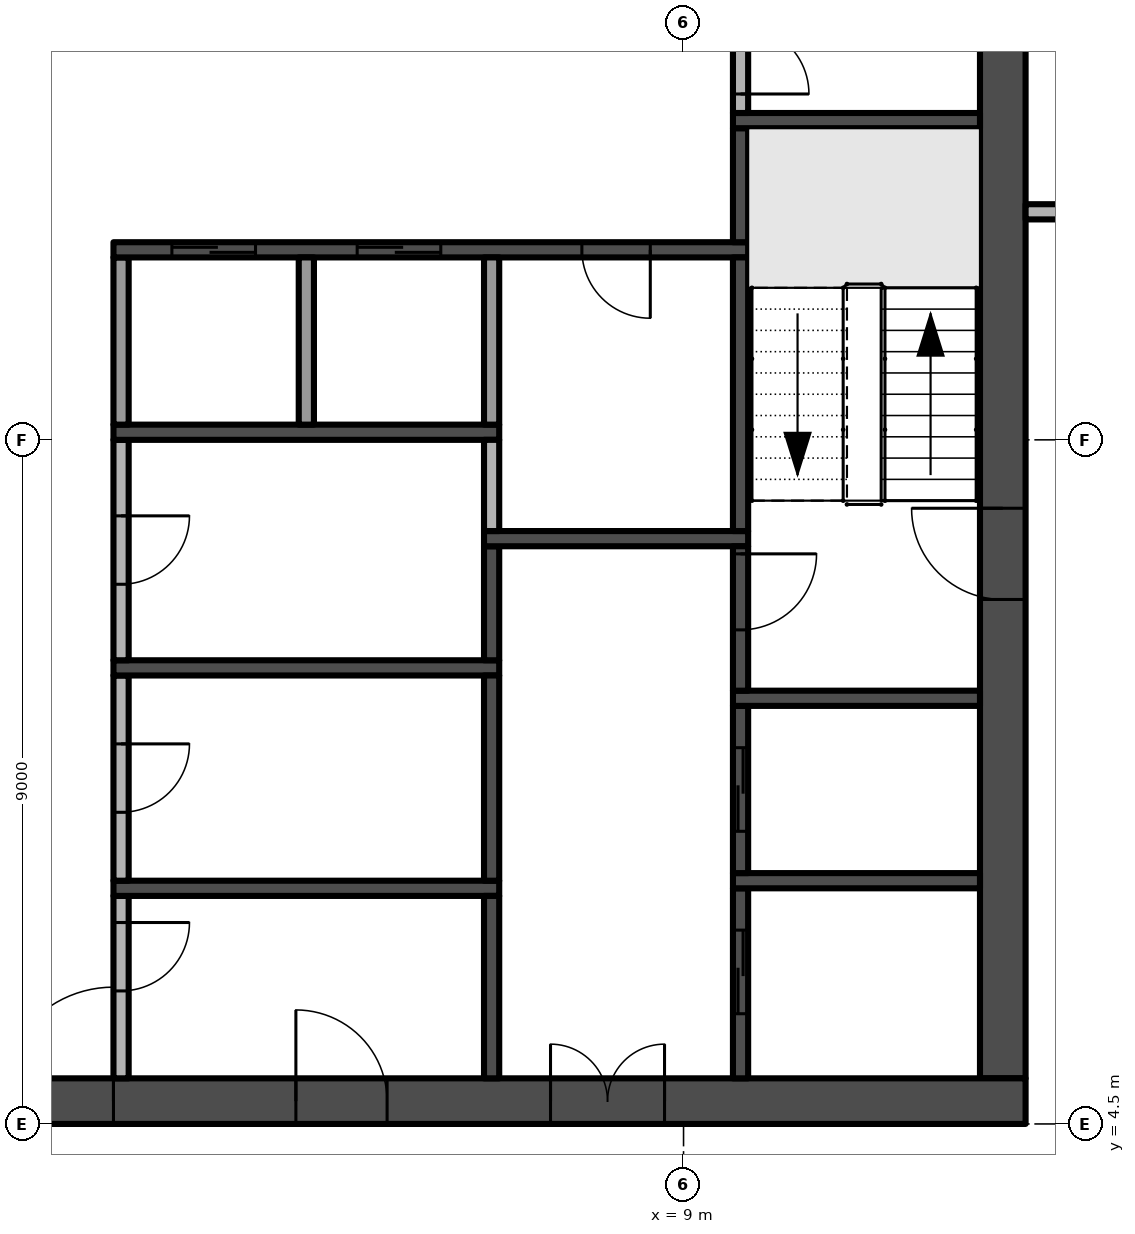
"""IFC4 building model, lengths in metres.
Left out: names, types, materials, properties, quantities, classifications, styles, units other than length and angle.
Written with IfcOpenShell. Run it as: python <this file> out.ifc"""

import sys

from ifc_helpers import new_model, si_unit, direction, frame, frame_2d, origin, place, context, subcontext, project, spatial, rectangle, extrude, element, fill, save


model = new_model("IFC4")
c1 = context("Model", 3, precision=1e-05, world=origin(), true_north=direction((0.0, 1.0)))
c2 = subcontext(c1, "Body", "Model", "MODEL_VIEW")
j1 = project(units=[si_unit("LENGTHUNIT", "METRE"), si_unit("PLANEANGLEUNIT", "RADIAN")], contexts=[c1])
p1 = place(None, origin())
s1 = spatial("IfcSite", under=j1, at=p1, CompositionType="ELEMENT")
p2 = place(p1, origin())
s2 = spatial("IfcBuilding", under=s1, at=p2, CompositionType="ELEMENT")
p3 = place(p2, frame((0.0, 0.0, 276.8)))
s3 = spatial("IfcBuildingStorey", under=s2, at=p3, CompositionType="ELEMENT", Elevation=276.8)
p4 = place(p3, frame((-13.5, 4.8, -0.3), z_axis=(0.0, 0.0, 1.0), x_axis=(1.0, 0.0, 0.0)))
e1 = element("IfcWall", 1, at=p4, inside=s3, PredefinedType="SHEAR", context=c2, shape_type="SweptSolid", body=[
    extrude(rectangle(XDim=27.0, YDim=0.6, at=frame_2d((13.5, 0.0))), origin(), (0.0, 0.0, 1.0), 3.8),
])
p5 = place(p4, frame((12.0, 0.0, 0.3)))
e2 = element("IfcOpeningElement", 2, at=p5, cuts=e1, PredefinedType="OPENING", context=c2, shape_type="SweptSolid", body=[
    extrude(rectangle(XDim=3.0, YDim=2.4, at=frame_2d((1.5, 1.2))), frame((0.0, 0.31, 0.0), z_axis=(0.0, -1.0, 0.0), x_axis=(1.0, 0.0, 0.0)), (0.0, 0.0, 1.0), 0.62),
])
p6 = place(p4, frame((4.9, 0.0, 0.3)))
e3 = element("IfcOpeningElement", 3, at=p6, cuts=e1, PredefinedType="OPENING", context=c2, shape_type="SweptSolid", body=[
    extrude(rectangle(XDim=1.2, YDim=2.2, at=frame_2d((0.6, 1.1))), frame((0.0, 0.31, 0.0), z_axis=(0.0, -1.0, 0.0), x_axis=(1.0, 0.0, 0.0)), (0.0, 0.0, 1.0), 0.62),
])
p7 = place(p4, frame((20.75, 0.0, 0.3)))
e4 = element("IfcOpeningElement", 4, at=p7, cuts=e1, PredefinedType="OPENING", context=c2, shape_type="SweptSolid", body=[
    extrude(rectangle(XDim=1.5, YDim=2.2, at=frame_2d((0.75, 1.1))), frame((0.0, 0.31, 0.0), z_axis=(0.0, -1.0, 0.0), x_axis=(1.0, 0.0, 0.0)), (0.0, 0.0, 1.0), 0.62),
])
p8 = place(p4, frame((17.4, 0.0, 0.3)))
e5 = element("IfcOpeningElement", 5, at=p8, cuts=e1, PredefinedType="OPENING", context=c2, shape_type="SweptSolid", body=[
    extrude(rectangle(XDim=1.2, YDim=2.2, at=frame_2d((0.6, 1.1))), frame((0.0, 0.31, 0.0), z_axis=(0.0, -1.0, 0.0), x_axis=(1.0, 0.0, 0.0)), (0.0, 0.0, 1.0), 0.62),
])
p9 = place(p3, frame((13.2, 5.1, -0.3), z_axis=(0.0, 0.0, 1.0), x_axis=(0.0, 1.0, 0.0)))
e6 = element("IfcWall", 6, at=p9, inside=s3, PredefinedType="SHEAR", context=c2, shape_type="SweptSolid", body=[
    extrude(rectangle(XDim=16.8, YDim=0.6, at=frame_2d((8.4, 0.0))), origin(), (0.0, 0.0, 1.0), 3.8),
])
p10 = place(p9, frame((6.3, 0.0, 0.3)))
e7 = element("IfcOpeningElement", 7, at=p10, cuts=e6, PredefinedType="OPENING", context=c2, shape_type="SweptSolid", body=[
    extrude(rectangle(XDim=1.2, YDim=2.2, at=frame_2d((0.6, 1.1))), frame((0.0, 0.31, 0.0), z_axis=(0.0, -1.0, 0.0), x_axis=(1.0, 0.0, 0.0)), (0.0, 0.0, 1.0), 0.62),
])
p11 = place(p3, frame((1.6, 7.5, 0.0), z_axis=(0.0, 0.0, 1.0), x_axis=(0.0, -1.0, 0.0)))
e8 = element("IfcWall", 8, at=p11, inside=s3, PredefinedType="PARTITIONING", context=c2, shape_type="SweptSolid", body=[
    extrude(rectangle(XDim=2.4, YDim=0.2, at=frame_2d((1.2, 0.0))), origin(), (0.0, 0.0, 1.0), 3.5),
])
p12 = place(p11, frame((0.35, 0.0, 0.0)))
e9 = element("IfcOpeningElement", 9, at=p12, cuts=e8, PredefinedType="OPENING", context=c2, shape_type="SweptSolid", body=[
    extrude(rectangle(XDim=0.9, YDim=2.1, at=frame_2d((0.45, 1.05))), frame((0.0, 0.11, 0.0), z_axis=(0.0, -1.0, 0.0), x_axis=(1.0, 0.0, 0.0)), (0.0, 0.0, 1.0), 0.22),
])
p13 = place(p3, frame((1.5, 7.6, 0.0), z_axis=(0.0, 0.0, 1.0), x_axis=(1.0, 0.0, 0.0)))
e10 = element("IfcWall", 10, at=p13, inside=s3, PredefinedType="SHEAR", context=c2, shape_type="SweptSolid", body=[
    extrude(rectangle(XDim=5.075, YDim=0.2, at=frame_2d((2.538, 0.0))), origin(), (0.0, 0.0, 1.0), 3.5),
])
p14 = place(p3, frame((1.6, 10.4, 0.0), z_axis=(0.0, 0.0, 1.0), x_axis=(0.0, -1.0, 0.0)))
e11 = element("IfcWall", 11, at=p14, inside=s3, PredefinedType="PARTITIONING", context=c2, shape_type="SweptSolid", body=[
    extrude(rectangle(XDim=2.7, YDim=0.2, at=frame_2d((1.35, 0.0))), origin(), (0.0, 0.0, 1.0), 3.5),
])
p15 = place(p14, frame((0.9, 0.0, 0.0)))
e12 = element("IfcOpeningElement", 12, at=p15, cuts=e11, PredefinedType="OPENING", context=c2, shape_type="SweptSolid", body=[
    extrude(rectangle(XDim=0.9, YDim=2.1, at=frame_2d((0.45, 1.05))), frame((0.0, 0.11, 0.0), z_axis=(0.0, -1.0, 0.0), x_axis=(1.0, 0.0, 0.0)), (0.0, 0.0, 1.0), 0.22),
])
p16 = place(p3, frame((1.5, 10.5, 0.0), z_axis=(0.0, 0.0, 1.0), x_axis=(1.0, 0.0, 0.0)))
e13 = element("IfcWall", 13, at=p16, inside=s3, PredefinedType="SHEAR", context=c2, shape_type="SweptSolid", body=[
    extrude(rectangle(XDim=5.075, YDim=0.2, at=frame_2d((2.538, 0.0))), origin(), (0.0, 0.0, 1.0), 3.5),
])
p17 = place(p3, frame((1.6, 13.5, 0.0), z_axis=(0.0, 0.0, 1.0), x_axis=(0.0, -1.0, 0.0)))
e14 = element("IfcWall", 14, at=p17, inside=s3, PredefinedType="PARTITIONING", context=c2, shape_type="SweptSolid", body=[
    extrude(rectangle(XDim=2.9, YDim=0.2, at=frame_2d((1.45, 0.0))), origin(), (0.0, 0.0, 1.0), 3.5),
])
p18 = place(p17, frame((1.0, 0.0, 0.0)))
e15 = element("IfcOpeningElement", 15, at=p18, cuts=e14, PredefinedType="OPENING", context=c2, shape_type="SweptSolid", body=[
    extrude(rectangle(XDim=0.9, YDim=2.1, at=frame_2d((0.45, 1.05))), frame((0.0, 0.11, 0.0), z_axis=(0.0, -1.0, 0.0), x_axis=(1.0, 0.0, 0.0)), (0.0, 0.0, 1.0), 0.22),
])
p19 = place(p3, frame((1.5, 13.6, 0.0), z_axis=(0.0, 0.0, 1.0), x_axis=(1.0, 0.0, 0.0)))
e16 = element("IfcWall", 16, at=p19, inside=s3, PredefinedType="SHEAR", context=c2, shape_type="SweptSolid", body=[
    extrude(rectangle(XDim=5.075, YDim=0.2, at=frame_2d((2.538, 0.0))), origin(), (0.0, 0.0, 1.0), 3.5),
])
p20 = place(p3, frame((1.6, 13.7, 0.0), z_axis=(0.0, 0.0, 1.0), x_axis=(0.0, 1.0, 0.0)))
e17 = element("IfcWall", 17, at=p20, inside=s3, PredefinedType="PARTITIONING", context=c2, shape_type="SweptSolid", body=[
    extrude(rectangle(XDim=2.2, YDim=0.2, at=frame_2d((1.1, 0.0))), origin(), (0.0, 0.0, 1.0), 3.5),
])
p21 = place(p3, frame((9.85, 16.0, 0.0), z_axis=(0.0, 0.0, 1.0), x_axis=(-1.0, 0.0, 0.0)))
e18 = element("IfcWall", 18, at=p21, inside=s3, PredefinedType="SHEAR", context=c2, shape_type="SweptSolid", body=[
    extrude(rectangle(XDim=8.35, YDim=0.2, at=frame_2d((4.175, 0.0))), origin(), (0.0, 0.0, 1.0), 3.5),
])
p22 = place(p21, frame((6.481, 0.0, 0.0)))
e19 = element("IfcOpeningElement", 19, at=p22, cuts=e18, PredefinedType="OPENING", context=c2, shape_type="SweptSolid", body=[
    extrude(rectangle(XDim=1.1, YDim=2.1, at=frame_2d((0.55, 1.05))), frame((0.0, 0.11, 0.0), z_axis=(0.0, -1.0, 0.0), x_axis=(1.0, 0.0, 0.0)), (0.0, 0.0, 1.0), 0.22),
])
p23 = place(p21, frame((4.044, 0.0, 0.0)))
e20 = element("IfcOpeningElement", 20, at=p23, cuts=e18, PredefinedType="OPENING", context=c2, shape_type="SweptSolid", body=[
    extrude(rectangle(XDim=1.1, YDim=2.1, at=frame_2d((0.55, 1.05))), frame((0.0, 0.11, 0.0), z_axis=(0.0, -1.0, 0.0), x_axis=(1.0, 0.0, 0.0)), (0.0, 0.0, 1.0), 0.22),
])
p24 = place(p21, frame((1.288, 0.0, 0.0)))
e21 = element("IfcOpeningElement", 21, at=p24, cuts=e18, PredefinedType="OPENING", context=c2, shape_type="SweptSolid", body=[
    extrude(rectangle(XDim=0.9, YDim=2.1, at=frame_2d((0.45, 1.05))), frame((0.0, 0.11, 0.0), z_axis=(0.0, -1.0, 0.0), x_axis=(1.0, 0.0, 0.0)), (0.0, 0.0, 1.0), 0.22),
])
p25 = place(p3, frame((4.037, 13.7, 0.0), z_axis=(0.0, 0.0, 1.0), x_axis=(0.0, 1.0, 0.0)))
e22 = element("IfcWall", 22, at=p25, inside=s3, PredefinedType="PARTITIONING", context=c2, shape_type="SweptSolid", body=[
    extrude(rectangle(XDim=2.2, YDim=0.2, at=frame_2d((1.1, 0.0))), origin(), (0.0, 0.0, 1.0), 3.5),
])
p26 = place(p3, frame((6.475, 5.1, 0.0), z_axis=(0.0, 0.0, 1.0), x_axis=(0.0, 1.0, 0.0)))
e23 = element("IfcWall", 23, at=p26, inside=s3, PredefinedType="SHEAR", context=c2, shape_type="SweptSolid", body=[
    extrude(rectangle(XDim=2.4, YDim=0.2, at=frame_2d((1.2, 0.0))), origin(), (0.0, 0.0, 1.0), 3.5),
])
p27 = place(p3, frame((6.475, 7.7, 0.0), z_axis=(0.0, 0.0, 1.0), x_axis=(0.0, 1.0, 0.0)))
e24 = element("IfcWall", 24, at=p27, inside=s3, PredefinedType="SHEAR", context=c2, shape_type="SweptSolid", body=[
    extrude(rectangle(XDim=2.7, YDim=0.2, at=frame_2d((1.35, 0.0))), origin(), (0.0, 0.0, 1.0), 3.5),
])
p28 = place(p3, frame((6.475, 10.6, 0.0), z_axis=(0.0, 0.0, 1.0), x_axis=(0.0, 1.0, 0.0)))
e25 = element("IfcWall", 25, at=p28, inside=s3, PredefinedType="SHEAR", context=c2, shape_type="SweptSolid", body=[
    extrude(rectangle(XDim=1.5, YDim=0.2, at=frame_2d((0.75, 0.0))), origin(), (0.0, 0.0, 1.0), 3.5),
])
p29 = place(p3, frame((6.375, 12.2, 0.0), z_axis=(0.0, 0.0, 1.0), x_axis=(1.0, 0.0, 0.0)))
e26 = element("IfcWall", 26, at=p29, inside=s3, PredefinedType="SHEAR", context=c2, shape_type="SweptSolid", body=[
    extrude(rectangle(XDim=3.475, YDim=0.2, at=frame_2d((1.738, 0.0))), origin(), (0.0, 0.0, 1.0), 3.5),
])
p30 = place(p3, frame((6.475, 12.3, 0.0), z_axis=(0.0, 0.0, 1.0), x_axis=(0.0, 1.0, 0.0)))
e27 = element("IfcWall", 27, at=p30, inside=s3, PredefinedType="PARTITIONING", context=c2, shape_type="SweptSolid", body=[
    extrude(rectangle(XDim=1.2, YDim=0.2, at=frame_2d((0.6, 0.0))), origin(), (0.0, 0.0, 1.0), 3.5),
])
p31 = place(p3, frame((6.475, 13.7, 0.0), z_axis=(0.0, 0.0, 1.0), x_axis=(0.0, 1.0, 0.0)))
e28 = element("IfcWall", 28, at=p31, inside=s3, PredefinedType="PARTITIONING", context=c2, shape_type="SweptSolid", body=[
    extrude(rectangle(XDim=2.2, YDim=0.2, at=frame_2d((1.1, 0.0))), origin(), (0.0, 0.0, 1.0), 3.5),
])
p32 = place(p3, frame((9.75, 5.1, 0.0), z_axis=(0.0, 0.0, 1.0), x_axis=(0.0, 1.0, 0.0)))
e29 = element("IfcWall", 29, at=p32, inside=s3, PredefinedType="SHEAR", context=c2, shape_type="SweptSolid", body=[
    extrude(rectangle(XDim=2.5, YDim=0.2, at=frame_2d((1.25, 0.0))), origin(), (0.0, 0.0, 1.0), 3.5),
])
p33 = place(p32, frame((0.85, 0.0, 0.0)))
e30 = element("IfcOpeningElement", 30, at=p33, cuts=e29, PredefinedType="OPENING", context=c2, shape_type="SweptSolid", body=[
    extrude(rectangle(XDim=1.1, YDim=2.1, at=frame_2d((0.55, 1.05))), frame((0.0, 0.11, 0.0), z_axis=(0.0, -1.0, 0.0), x_axis=(1.0, 0.0, 0.0)), (0.0, 0.0, 1.0), 0.22),
])
p34 = place(p3, frame((9.65, 7.7, 0.0), z_axis=(0.0, 0.0, 1.0), x_axis=(1.0, 0.0, 0.0)))
e31 = element("IfcWall", 31, at=p34, inside=s3, PredefinedType="SHEAR", context=c2, shape_type="SweptSolid", body=[
    extrude(rectangle(XDim=3.25, YDim=0.2, at=frame_2d((1.625, 0.0))), origin(), (0.0, 0.0, 1.0), 3.5),
])
p35 = place(p3, frame((9.75, 7.8, 0.0), z_axis=(0.0, 0.0, 1.0), x_axis=(0.0, 1.0, 0.0)))
e32 = element("IfcWall", 32, at=p35, inside=s3, PredefinedType="SHEAR", context=c2, shape_type="SweptSolid", body=[
    extrude(rectangle(XDim=2.2, YDim=0.2, at=frame_2d((1.1, 0.0))), origin(), (0.0, 0.0, 1.0), 3.5),
])
p36 = place(p35, frame((0.55, 0.0, 0.0)))
e33 = element("IfcOpeningElement", 33, at=p36, cuts=e32, PredefinedType="OPENING", context=c2, shape_type="SweptSolid", body=[
    extrude(rectangle(XDim=1.1, YDim=2.1, at=frame_2d((0.55, 1.05))), frame((0.0, 0.11, 0.0), z_axis=(0.0, -1.0, 0.0), x_axis=(1.0, 0.0, 0.0)), (0.0, 0.0, 1.0), 0.22),
])
p37 = place(p3, frame((9.65, 10.1, 0.0), z_axis=(0.0, 0.0, 1.0), x_axis=(1.0, 0.0, 0.0)))
e34 = element("IfcWall", 34, at=p37, inside=s3, PredefinedType="SHEAR", context=c2, shape_type="SweptSolid", body=[
    extrude(rectangle(XDim=3.25, YDim=0.2, at=frame_2d((1.625, 0.0))), origin(), (0.0, 0.0, 1.0), 3.5),
])
p38 = place(p3, frame((9.75, 12.1, 0.0), z_axis=(0.0, 0.0, 1.0), x_axis=(0.0, -1.0, 0.0)))
e35 = element("IfcWall", 35, at=p38, inside=s3, PredefinedType="SHEAR", context=c2, shape_type="SweptSolid", body=[
    extrude(rectangle(XDim=1.9, YDim=0.2, at=frame_2d((0.95, 0.0))), origin(), (0.0, 0.0, 1.0), 3.5),
])
p39 = place(p38, frame((0.1, 0.0, 0.0)))
e36 = element("IfcOpeningElement", 36, at=p39, cuts=e35, PredefinedType="OPENING", context=c2, shape_type="SweptSolid", body=[
    extrude(rectangle(XDim=1.0, YDim=2.2, at=frame_2d((0.5, 1.1))), frame((0.0, 0.11, 0.0), z_axis=(0.0, -1.0, 0.0), x_axis=(1.0, 0.0, 0.0)), (0.0, 0.0, 1.0), 0.22),
])
p40 = place(p3, frame((9.75, 12.3, 0.0), z_axis=(0.0, 0.0, 1.0), x_axis=(0.0, 1.0, 0.0)))
e37 = element("IfcWall", 37, at=p40, inside=s3, PredefinedType="SHEAR", context=c2, shape_type="SweptSolid", body=[
    extrude(rectangle(XDim=3.6, YDim=0.2, at=frame_2d((1.8, 0.0))), origin(), (0.0, 0.0, 1.0), 3.5),
])
p41 = place(p3, frame((9.75, 16.1, 0.0), z_axis=(0.0, 0.0, 1.0), x_axis=(0.0, 1.0, 0.0)))
e38 = element("IfcWall", 38, at=p41, inside=s3, PredefinedType="SHEAR", context=c2, shape_type="SweptSolid", body=[
    extrude(rectangle(XDim=1.5, YDim=0.2, at=frame_2d((0.75, 0.0))), origin(), (0.0, 0.0, 1.0), 3.5),
])
p42 = place(p3, frame((9.65, 17.7, 0.0), z_axis=(0.0, 0.0, 1.0), x_axis=(1.0, 0.0, 0.0)))
e39 = element("IfcWall", 39, at=p42, inside=s3, PredefinedType="SHEAR", context=c2, shape_type="SweptSolid", body=[
    extrude(rectangle(XDim=3.25, YDim=0.2, at=frame_2d((1.625, 0.0))), origin(), (0.0, 0.0, 1.0), 3.5),
])
p43 = place(p3, frame((9.75, 19.2, 0.0), z_axis=(0.0, 0.0, 1.0), x_axis=(0.0, -1.0, 0.0)))
e40 = element("IfcWall", 40, at=p43, inside=s3, PredefinedType="PARTITIONING", context=c2, shape_type="SweptSolid", body=[
    extrude(rectangle(XDim=1.4, YDim=0.2, at=frame_2d((0.7, 0.0))), origin(), (0.0, 0.0, 1.0), 3.5),
])
p44 = place(p43, frame((0.25, 0.0, 0.0)))
e41 = element("IfcOpeningElement", 41, at=p44, cuts=e40, PredefinedType="OPENING", context=c2, shape_type="SweptSolid", body=[
    extrude(rectangle(XDim=0.9, YDim=2.1, at=frame_2d((0.45, 1.05))), frame((0.0, 0.11, 0.0), z_axis=(0.0, -1.0, 0.0), x_axis=(1.0, 0.0, 0.0)), (0.0, 0.0, 1.0), 0.22),
])
p45 = place(p3, frame((13.5, 16.5, 0.0), z_axis=(0.0, 0.0, 1.0), x_axis=(1.0, 0.0, 0.0)))
e42 = element("IfcWall", 42, at=p45, inside=s3, PredefinedType="PARTITIONING", context=c2, shape_type="SweptSolid", body=[
    extrude(rectangle(XDim=3.825, YDim=0.2, at=frame_2d((1.913, 0.0))), origin(), (0.0, 0.0, 1.0), 3.5),
])
p46 = place(p45, frame((1.55, 0.0, 0.0)))
e43 = element("IfcOpeningElement", 43, at=p46, cuts=e42, PredefinedType="OPENING", context=c2, shape_type="SweptSolid", body=[
    extrude(rectangle(XDim=0.9, YDim=2.1, at=frame_2d((0.45, 1.05))), frame((0.0, 0.11, 0.0), z_axis=(0.0, -1.0, 0.0), x_axis=(1.0, 0.0, 0.0)), (0.0, 0.0, 1.0), 0.22),
])
p47 = place(p5, frame((3.0, 0.0, 0.0), z_axis=(0.0, 0.0, 1.0), x_axis=(-1.0, 0.0, 0.0)))
e44 = element("IfcDoor", 44, at=p47, inside=s3, OperationType="DOUBLE_DOOR_SINGLE_SWING", PredefinedType="DOOR", context=c2, shape_type="SweptSolid", body=[
    extrude(rectangle(XDim=3.0, YDim=2.4, at=frame_2d((1.5, 1.2))), frame((0.0, 0.025, 0.0), z_axis=(0.0, -1.0, 0.0), x_axis=(1.0, 0.0, 0.0)), (0.0, 0.0, 1.0), 0.05),
])
fill(e2, e44)
p48 = place(p10, frame((1.2, 0.0, 0.0), z_axis=(0.0, 0.0, 1.0), x_axis=(-1.0, 0.0, 0.0)))
e45 = element("IfcDoor", 45, at=p48, inside=s3, OperationType="SINGLE_SWING_LEFT", PredefinedType="DOOR", context=c2, shape_type="SweptSolid", body=[
    extrude(rectangle(XDim=1.2, YDim=2.2, at=frame_2d((0.6, 1.1))), frame((0.0, 0.025, 0.0), z_axis=(0.0, -1.0, 0.0), x_axis=(1.0, 0.0, 0.0)), (0.0, 0.0, 1.0), 0.05),
])
fill(e7, e45)
p49 = place(p7, frame((1.5, 0.0, 0.0), z_axis=(0.0, 0.0, 1.0), x_axis=(-1.0, 0.0, 0.0)))
e46 = element("IfcDoor", 46, at=p49, inside=s3, OperationType="DOUBLE_DOOR_SINGLE_SWING", PredefinedType="DOOR", context=c2, shape_type="SweptSolid", body=[
    extrude(rectangle(XDim=1.5, YDim=2.2, at=frame_2d((0.75, 1.1))), frame((0.0, 0.025, 0.0), z_axis=(0.0, -1.0, 0.0), x_axis=(1.0, 0.0, 0.0)), (0.0, 0.0, 1.0), 0.05),
])
fill(e4, e46)
p50 = place(p8, frame((1.2, 0.0, 0.0), z_axis=(0.0, 0.0, 1.0), x_axis=(-1.0, 0.0, 0.0)))
e47 = element("IfcDoor", 47, at=p50, inside=s3, OperationType="SINGLE_SWING_RIGHT", PredefinedType="DOOR", context=c2, shape_type="SweptSolid", body=[
    extrude(rectangle(XDim=1.2, YDim=2.2, at=frame_2d((0.6, 1.1))), frame((0.0, 0.025, 0.0), z_axis=(0.0, -1.0, 0.0), x_axis=(1.0, 0.0, 0.0)), (0.0, 0.0, 1.0), 0.05),
])
fill(e5, e47)
p51 = place(p39, origin())
e48 = element("IfcDoor", 48, at=p51, inside=s3, OperationType="SINGLE_SWING_LEFT", PredefinedType="DOOR", context=c2, shape_type="SweptSolid", body=[
    extrude(rectangle(XDim=1.0, YDim=2.2, at=frame_2d((0.5, 1.1))), frame((0.0, 0.025, 0.0), z_axis=(0.0, -1.0, 0.0), x_axis=(1.0, 0.0, 0.0)), (0.0, 0.0, 1.0), 0.05),
])
fill(e36, e48)
p52 = place(p22, origin())
e49 = element("IfcDoor", 49, at=p52, inside=s3, OperationType="SLIDING_TO_RIGHT", PredefinedType="DOOR", context=c2, shape_type="SweptSolid", body=[
    extrude(rectangle(XDim=1.1, YDim=2.1, at=frame_2d((0.55, 1.05))), frame((0.0, 0.025, 0.0), z_axis=(0.0, -1.0, 0.0), x_axis=(1.0, 0.0, 0.0)), (0.0, 0.0, 1.0), 0.05),
])
fill(e19, e49)
p53 = place(p23, origin())
e50 = element("IfcDoor", 50, at=p53, inside=s3, OperationType="SLIDING_TO_RIGHT", PredefinedType="DOOR", context=c2, shape_type="SweptSolid", body=[
    extrude(rectangle(XDim=1.1, YDim=2.1, at=frame_2d((0.55, 1.05))), frame((0.0, 0.025, 0.0), z_axis=(0.0, -1.0, 0.0), x_axis=(1.0, 0.0, 0.0)), (0.0, 0.0, 1.0), 0.05),
])
fill(e20, e50)
p54 = place(p33, origin())
e51 = element("IfcDoor", 51, at=p54, inside=s3, OperationType="SLIDING_TO_RIGHT", PredefinedType="DOOR", context=c2, shape_type="SweptSolid", body=[
    extrude(rectangle(XDim=1.1, YDim=2.1, at=frame_2d((0.55, 1.05))), frame((0.0, 0.025, 0.0), z_axis=(0.0, -1.0, 0.0), x_axis=(1.0, 0.0, 0.0)), (0.0, 0.0, 1.0), 0.05),
])
fill(e30, e51)
p55 = place(p36, origin())
e52 = element("IfcDoor", 52, at=p55, inside=s3, OperationType="SLIDING_TO_RIGHT", PredefinedType="DOOR", context=c2, shape_type="SweptSolid", body=[
    extrude(rectangle(XDim=1.1, YDim=2.1, at=frame_2d((0.55, 1.05))), frame((0.0, 0.025, 0.0), z_axis=(0.0, -1.0, 0.0), x_axis=(1.0, 0.0, 0.0)), (0.0, 0.0, 1.0), 0.05),
])
fill(e33, e52)
p56 = place(p12, origin())
e53 = element("IfcDoor", 53, at=p56, inside=s3, OperationType="SINGLE_SWING_LEFT", PredefinedType="DOOR", context=c2, shape_type="SweptSolid", body=[
    extrude(rectangle(XDim=0.9, YDim=2.1, at=frame_2d((0.45, 1.05))), frame((0.0, 0.025, 0.0), z_axis=(0.0, -1.0, 0.0), x_axis=(1.0, 0.0, 0.0)), (0.0, 0.0, 1.0), 0.05),
])
fill(e9, e53)
p57 = place(p15, origin())
e54 = element("IfcDoor", 54, at=p57, inside=s3, OperationType="SINGLE_SWING_LEFT", PredefinedType="DOOR", context=c2, shape_type="SweptSolid", body=[
    extrude(rectangle(XDim=0.9, YDim=2.1, at=frame_2d((0.45, 1.05))), frame((0.0, 0.025, 0.0), z_axis=(0.0, -1.0, 0.0), x_axis=(1.0, 0.0, 0.0)), (0.0, 0.0, 1.0), 0.05),
])
fill(e12, e54)
p58 = place(p18, origin())
e55 = element("IfcDoor", 55, at=p58, inside=s3, OperationType="SINGLE_SWING_LEFT", PredefinedType="DOOR", context=c2, shape_type="SweptSolid", body=[
    extrude(rectangle(XDim=0.9, YDim=2.1, at=frame_2d((0.45, 1.05))), frame((0.0, 0.025, 0.0), z_axis=(0.0, -1.0, 0.0), x_axis=(1.0, 0.0, 0.0)), (0.0, 0.0, 1.0), 0.05),
])
fill(e15, e55)
p59 = place(p24, origin())
e56 = element("IfcDoor", 56, at=p59, inside=s3, OperationType="SINGLE_SWING_LEFT", PredefinedType="DOOR", context=c2, shape_type="SweptSolid", body=[
    extrude(rectangle(XDim=0.9, YDim=2.1, at=frame_2d((0.45, 1.05))), frame((0.0, 0.025, 0.0), z_axis=(0.0, -1.0, 0.0), x_axis=(1.0, 0.0, 0.0)), (0.0, 0.0, 1.0), 0.05),
])
fill(e21, e56)
p60 = place(p44, origin())
e57 = element("IfcDoor", 57, at=p60, inside=s3, OperationType="SINGLE_SWING_RIGHT", PredefinedType="DOOR", context=c2, shape_type="SweptSolid", body=[
    extrude(rectangle(XDim=0.9, YDim=2.1, at=frame_2d((0.45, 1.05))), frame((0.0, 0.025, 0.0), z_axis=(0.0, -1.0, 0.0), x_axis=(1.0, 0.0, 0.0)), (0.0, 0.0, 1.0), 0.05),
])
fill(e41, e57)
save(model, sys.argv[1])
